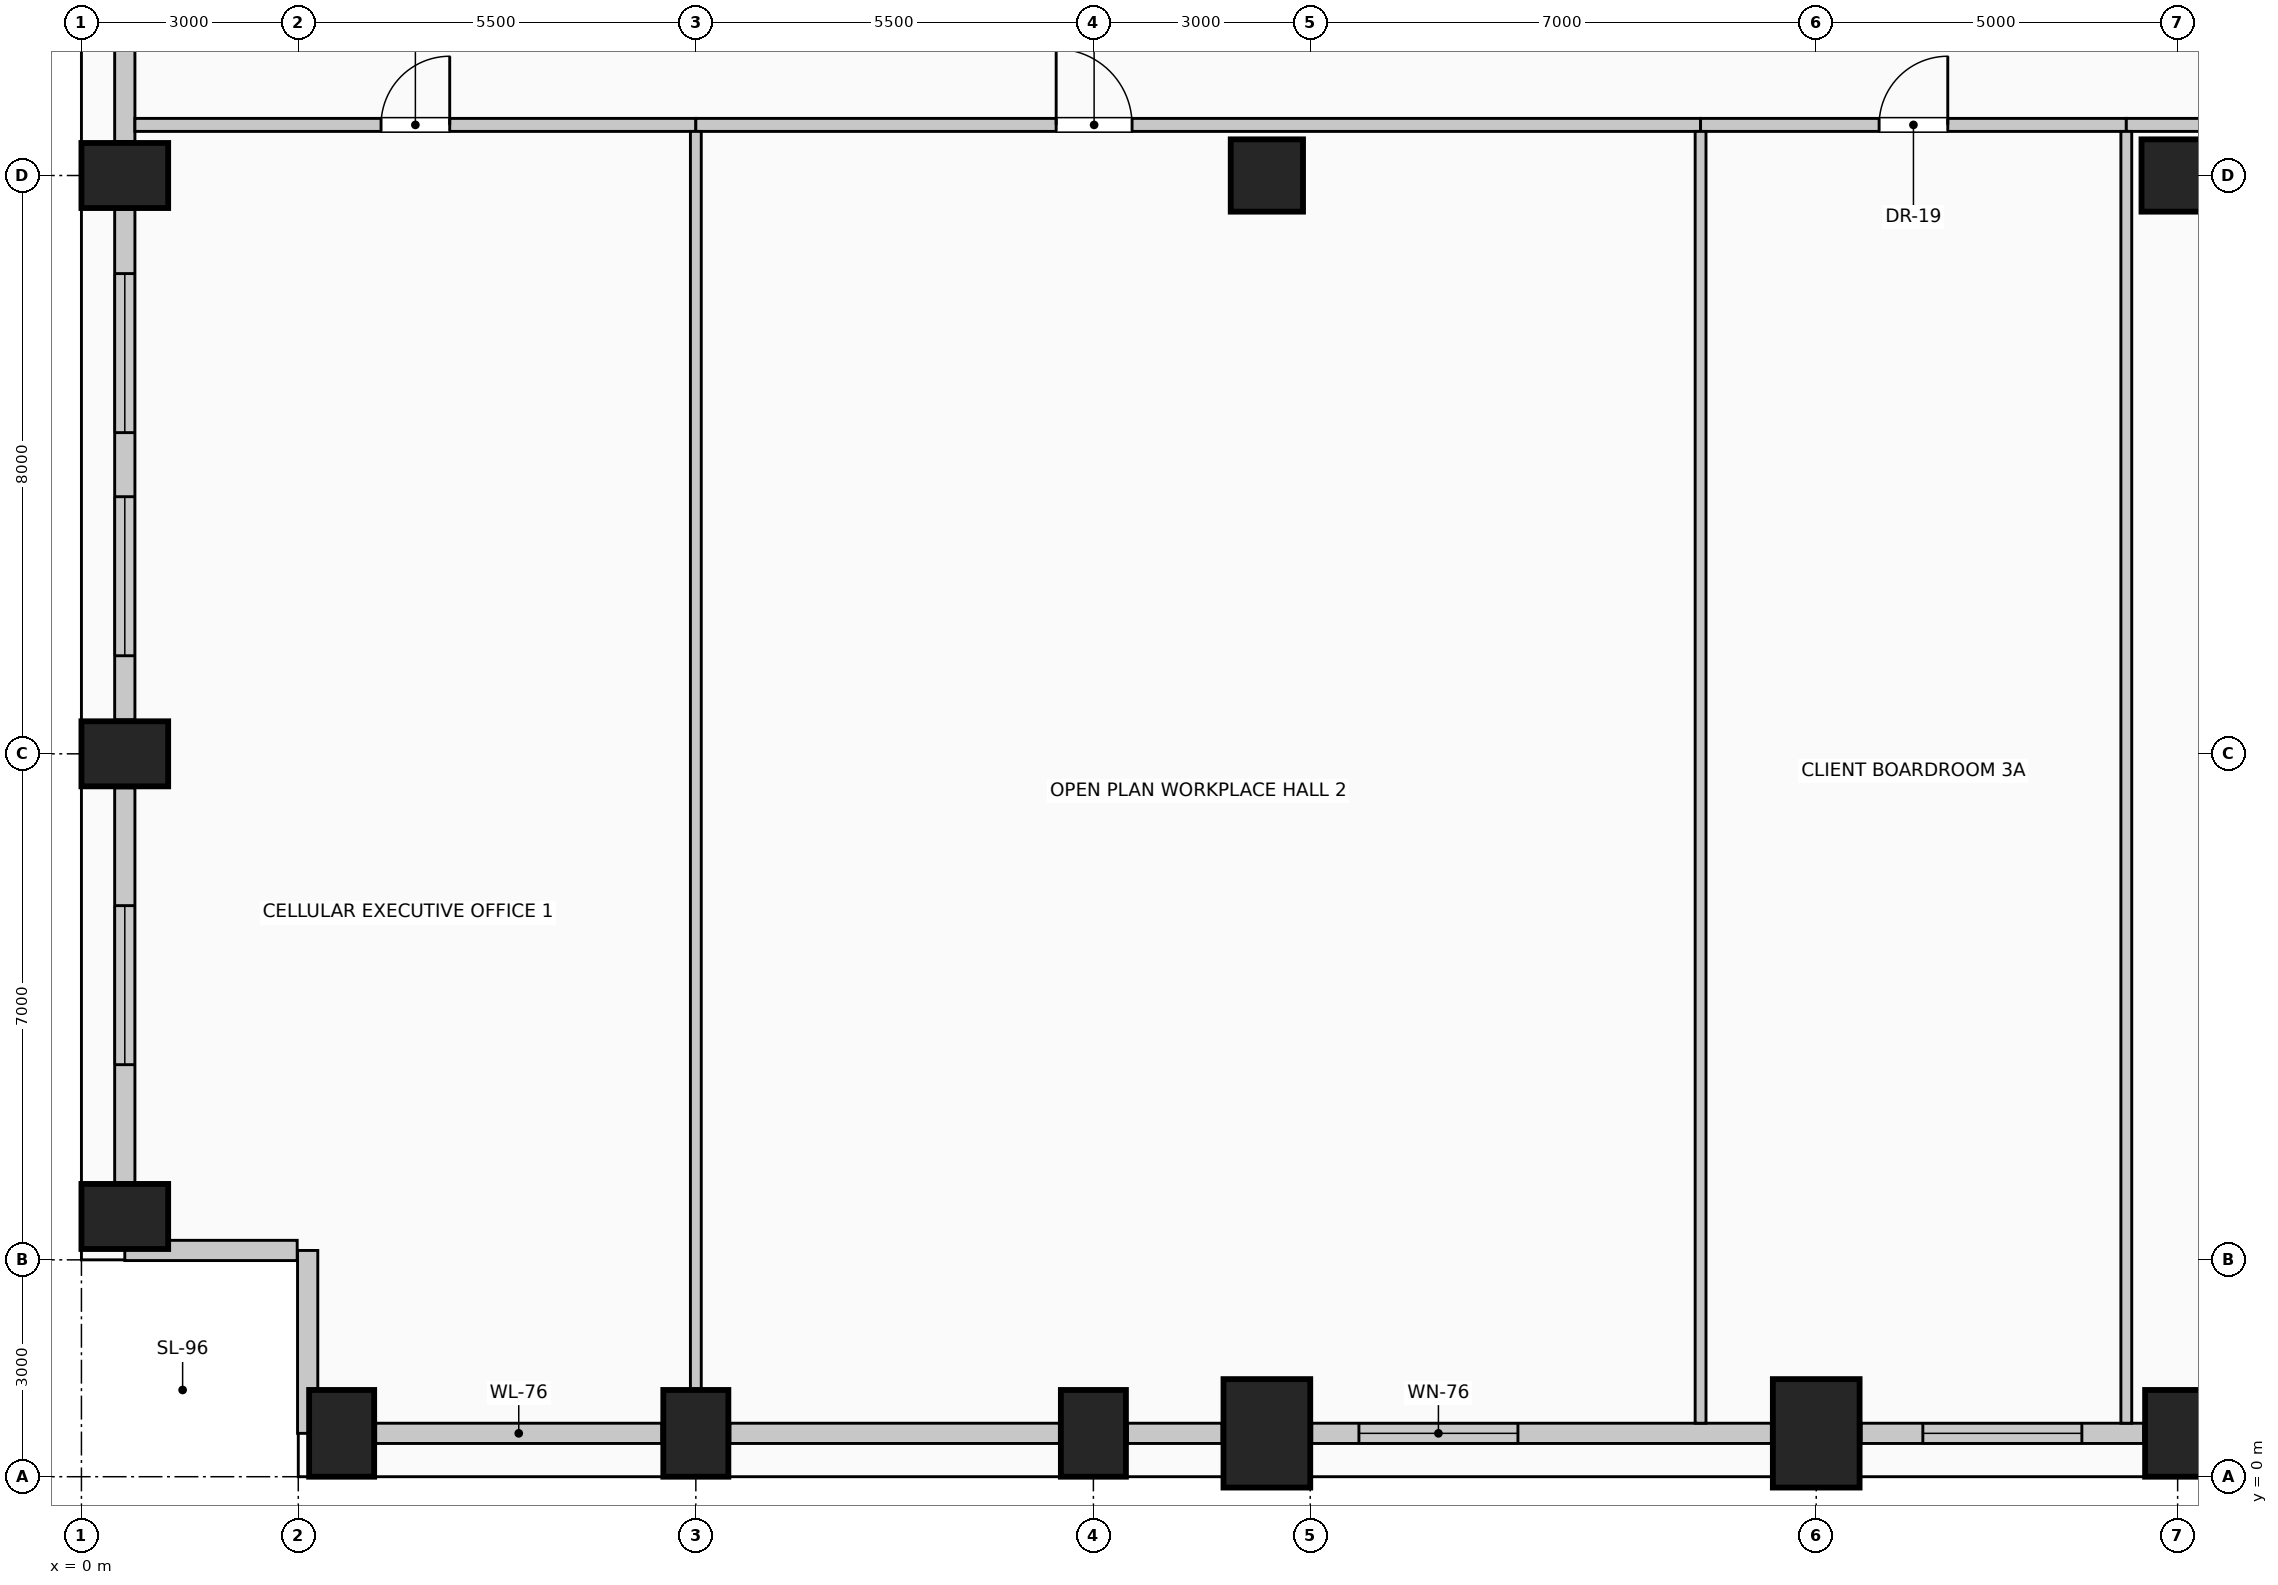
"""IFC4 building model, lengths in metres.
Left out: names, types, materials, properties, quantities, classifications, styles, units other than length and angle.
Written with IfcOpenShell. Run it as: python <this file> out.ifc"""

import sys

from ifc_helpers import new_model, si_unit, direction, frame, frame_2d, origin, origin_2d, place, context, subcontext, project, spatial, rectangle, circle, extrude, element, fill, save


model = new_model("IFC4")
c1 = context("Model", 3, precision=1e-05, world=origin(), true_north=direction((0.0, 1.0)))
c2 = subcontext(c1, "Body", "Model", "MODEL_VIEW")
j1 = project(units=[si_unit("LENGTHUNIT", "METRE"), si_unit("PLANEANGLEUNIT", "RADIAN")], contexts=[c1])
p1 = place(None, origin())
s1 = spatial("IfcSite", under=j1, at=p1, CompositionType="ELEMENT")
p2 = place(p1, origin())
s2 = spatial("IfcBuilding", under=s1, at=p2, CompositionType="ELEMENT")
p3 = place(p2, frame((0.0, 0.0, 74.6)))
s3 = spatial("IfcBuildingStorey", under=s2, at=p3, CompositionType="ELEMENT", Elevation=74.6)
for number, where, z_axis, x_axis in (
    (1, (3.6, 0.6, 0.0), (0.0, 0.0, 1.0), (1.0, 0.0, 0.0)),
    (2, (8.5, 0.6, 0.0), (0.0, 0.0, 1.0), (1.0, 0.0, 0.0)),
    (3, (14.0, 0.6, 0.0), (0.0, 0.0, 1.0), (1.0, 0.0, 0.0)),
):
    element("IfcColumn", number, at=place(p3, frame(where, z_axis=z_axis, x_axis=x_axis)), inside=s3, PredefinedType="COLUMN", context=c2, shape_type="SweptSolid", body=[
        extrude(rectangle(XDim=0.9, YDim=1.2, at=origin_2d()), origin(), (0.0, 0.0, 1.0), 4.0),
    ])
for number, where, z_axis, x_axis in (
    (4, (16.4, 0.6, 0.0), (0.0, 0.0, 1.0), (1.0, 0.0, 0.0)),
    (5, (24.0, 0.6, 0.0), (0.0, 0.0, 1.0), (1.0, 0.0, 0.0)),
):
    element("IfcColumn", number, at=place(p3, frame(where, z_axis=z_axis, x_axis=x_axis)), inside=s3, PredefinedType="COLUMN", context=c2, shape_type="SweptSolid", body=[
        extrude(rectangle(XDim=1.2, YDim=1.5, at=origin_2d()), origin(), (0.0, 0.0, 1.0), 4.0),
    ])
for number, where, z_axis, x_axis in (
    (6, (29.0, 0.6, 0.0), (0.0, 0.0, 1.0), (1.0, 0.0, 0.0)),
    (7, (0.6, 3.6, 0.0), (0.0, 0.0, 1.0), (0.0, 1.0, 0.0)),
    (8, (0.6, 10.0, 0.0), (0.0, 0.0, 1.0), (0.0, 1.0, 0.0)),
    (9, (0.6, 18.0, 0.0), (0.0, 0.0, 1.0), (0.0, 1.0, 0.0)),
):
    element("IfcColumn", number, at=place(p3, frame(where, z_axis=z_axis, x_axis=x_axis)), inside=s3, PredefinedType="COLUMN", context=c2, shape_type="SweptSolid", body=[
        extrude(rectangle(XDim=0.9, YDim=1.2, at=origin_2d()), origin(), (0.0, 0.0, 1.0), 4.0),
    ])
for number, where, z_axis, x_axis in (
    (10, (16.4, 18.0, 0.0), (0.0, 0.0, 1.0), (1.0, 0.0, 0.0)),
    (11, (29.0, 18.0, 0.0), (0.0, 0.0, 1.0), (1.0, 0.0, 0.0)),
):
    element("IfcColumn", number, at=place(p3, frame(where, z_axis=z_axis, x_axis=x_axis)), inside=s3, PredefinedType="COLUMN", context=c2, shape_type="SweptSolid", body=[
        extrude(circle(Radius=0.5, at=origin_2d()), origin(), (0.0, 0.0, 1.0), 4.0),
    ])
p4 = place(p3, frame((8.03, 0.6, 0.0), z_axis=(0.0, 0.0, 1.0), x_axis=(-1.0, 0.0, 0.0)))
e12 = element("IfcWall", 12, at=p4, inside=s3, PredefinedType="SOLIDWALL", context=c2, shape_type="SweptSolid", body=[
    extrude(rectangle(XDim=3.96, YDim=0.28, at=frame_2d((1.98, 0.0))), origin(), (0.0, 0.0, 1.0), 2.85),
])
p5 = place(p3, frame((13.53, 0.6, 0.0), z_axis=(0.0, 0.0, 1.0), x_axis=(-1.0, 0.0, 0.0)))
e13 = element("IfcWall", 13, at=p5, inside=s3, PredefinedType="SOLIDWALL", context=c2, shape_type="SweptSolid", body=[
    extrude(rectangle(XDim=4.56, YDim=0.28, at=frame_2d((2.28, 0.0))), origin(), (0.0, 0.0, 1.0), 2.85),
])
p6 = place(p3, frame((15.78, 0.6, 0.0), z_axis=(0.0, 0.0, 1.0), x_axis=(-1.0, 0.0, 0.0)))
e14 = element("IfcWall", 14, at=p6, inside=s3, PredefinedType="SOLIDWALL", context=c2, shape_type="SweptSolid", body=[
    extrude(rectangle(XDim=1.31, YDim=0.28, at=frame_2d((0.655, 0.0))), origin(), (0.0, 0.0, 1.0), 2.85),
])
p7 = place(p3, frame((23.38, 0.6, 0.0), z_axis=(0.0, 0.0, 1.0), x_axis=(-1.0, 0.0, 0.0)))
e15 = element("IfcWall", 15, at=p7, inside=s3, PredefinedType="SOLIDWALL", context=c2, shape_type="SweptSolid", body=[
    extrude(rectangle(XDim=6.36, YDim=0.28, at=frame_2d((3.18, 0.0))), origin(), (0.0, 0.0, 1.0), 2.85),
])
p8 = place(p7, frame((3.507, 0.0, 0.5)))
e16 = element("IfcOpeningElement", 16, at=p8, cuts=e15, PredefinedType="OPENING", context=c2, shape_type="SweptSolid", body=[
    extrude(rectangle(XDim=2.2, YDim=1.95, at=frame_2d((1.1, 0.975))), frame((0.0, 0.15, 0.0), z_axis=(0.0, -1.0, 0.0), x_axis=(1.0, 0.0, 0.0)), (0.0, 0.0, 1.0), 0.3),
])
p9 = place(p3, frame((28.53, 0.6, 0.0), z_axis=(0.0, 0.0, 1.0), x_axis=(-1.0, 0.0, 0.0)))
e17 = element("IfcWall", 17, at=p9, inside=s3, PredefinedType="SOLIDWALL", context=c2, shape_type="SweptSolid", body=[
    extrude(rectangle(XDim=3.91, YDim=0.28, at=frame_2d((1.955, 0.0))), origin(), (0.0, 0.0, 1.0), 2.85),
])
p10 = place(p9, frame((0.855, 0.0, 0.5)))
e18 = element("IfcOpeningElement", 18, at=p10, cuts=e17, PredefinedType="OPENING", context=c2, shape_type="SweptSolid", body=[
    extrude(rectangle(XDim=2.2, YDim=1.95, at=frame_2d((1.1, 0.975))), frame((0.0, 0.15, 0.0), z_axis=(0.0, -1.0, 0.0), x_axis=(1.0, 0.0, 0.0)), (0.0, 0.0, 1.0), 0.3),
])
p11 = place(p3, frame((0.6, 4.07, 0.0), z_axis=(0.0, 0.0, 1.0), x_axis=(0.0, 1.0, 0.0)))
e19 = element("IfcWall", 19, at=p11, inside=s3, PredefinedType="SOLIDWALL", context=c2, shape_type="SweptSolid", body=[
    extrude(rectangle(XDim=5.46, YDim=0.28, at=frame_2d((2.73, 0.0))), origin(), (0.0, 0.0, 1.0), 2.85),
])
p12 = place(p11, frame((1.63, 0.0, 0.5)))
e20 = element("IfcOpeningElement", 20, at=p12, cuts=e19, PredefinedType="OPENING", context=c2, shape_type="SweptSolid", body=[
    extrude(rectangle(XDim=2.2, YDim=1.95, at=frame_2d((1.1, 0.975))), frame((0.0, 0.15, 0.0), z_axis=(0.0, -1.0, 0.0), x_axis=(1.0, 0.0, 0.0)), (0.0, 0.0, 1.0), 0.3),
])
p13 = place(p3, frame((0.6, 10.47, 0.0), z_axis=(0.0, 0.0, 1.0), x_axis=(0.0, 1.0, 0.0)))
e21 = element("IfcWall", 21, at=p13, inside=s3, PredefinedType="SOLIDWALL", context=c2, shape_type="SweptSolid", body=[
    extrude(rectangle(XDim=7.06, YDim=0.28, at=frame_2d((3.53, 0.0))), origin(), (0.0, 0.0, 1.0), 2.85),
])
p14 = place(p13, frame((0.887, 0.0, 0.5)))
e22 = element("IfcOpeningElement", 22, at=p14, cuts=e21, PredefinedType="OPENING", context=c2, shape_type="SweptSolid", body=[
    extrude(rectangle(XDim=2.2, YDim=1.95, at=frame_2d((1.1, 0.975))), frame((0.0, 0.15, 0.0), z_axis=(0.0, -1.0, 0.0), x_axis=(1.0, 0.0, 0.0)), (0.0, 0.0, 1.0), 0.3),
])
p15 = place(p13, frame((3.973, 0.0, 0.5)))
e23 = element("IfcOpeningElement", 23, at=p15, cuts=e21, PredefinedType="OPENING", context=c2, shape_type="SweptSolid", body=[
    extrude(rectangle(XDim=2.2, YDim=1.95, at=frame_2d((1.1, 0.975))), frame((0.0, 0.15, 0.0), z_axis=(0.0, -1.0, 0.0), x_axis=(1.0, 0.0, 0.0)), (0.0, 0.0, 1.0), 0.3),
])
p16 = place(p3, frame((0.6, 18.47, 0.0), z_axis=(0.0, 0.0, 1.0), x_axis=(0.0, 1.0, 0.0)))
e24 = element("IfcWall", 24, at=p16, inside=s3, PredefinedType="SOLIDWALL", context=c2, shape_type="SweptSolid", body=[
    extrude(rectangle(XDim=7.06, YDim=0.28, at=frame_2d((3.53, 0.0))), origin(), (0.0, 0.0, 1.0), 2.85),
])
p17 = place(p3, frame((3.13, 0.6, 0.0), z_axis=(0.0, 0.0, 1.0), x_axis=(0.0, 1.0, 0.0)))
e25 = element("IfcWall", 25, at=p17, inside=s3, PredefinedType="SOLIDWALL", context=c2, shape_type="SweptSolid", body=[
    extrude(rectangle(XDim=2.53, YDim=0.28, at=frame_2d((1.265, 0.0))), origin(), (0.0, 0.0, 1.0), 3.7),
])
p18 = place(p3, frame((2.985, 3.13, 0.0), z_axis=(0.0, 0.0, 1.0), x_axis=(-1.0, 0.0, 0.0)))
e26 = element("IfcWall", 26, at=p18, inside=s3, PredefinedType="SOLIDWALL", context=c2, shape_type="SweptSolid", body=[
    extrude(rectangle(XDim=2.385, YDim=0.28, at=frame_2d((1.192, 0.0))), origin(), (0.0, 0.0, 1.0), 3.7),
])
p19 = place(p3, frame((0.74, 18.7, 0.0), z_axis=(0.0, 0.0, 1.0), x_axis=(1.0, 0.0, 0.0)))
e27 = element("IfcWall", 27, at=p19, inside=s3, PredefinedType="PARTITIONING", context=c2, shape_type="SweptSolid", body=[
    extrude(rectangle(XDim=7.76, YDim=0.18, at=frame_2d((3.88, 0.0))), origin(), (0.0, 0.0, 1.0), 3.7),
])
p20 = place(p19, frame((3.405, 0.0, 0.0)))
e28 = element("IfcOpeningElement", 28, at=p20, cuts=e27, PredefinedType="OPENING", context=c2, shape_type="SweptSolid", body=[
    extrude(rectangle(XDim=0.95, YDim=2.15, at=frame_2d((0.475, 1.075))), frame((0.0, 0.1, 0.0), z_axis=(0.0, -1.0, 0.0), x_axis=(1.0, 0.0, 0.0)), (0.0, 0.0, 1.0), 0.2),
])
p21 = place(p3, frame((8.5, 18.7, 0.0), z_axis=(0.0, 0.0, 1.0), x_axis=(1.0, 0.0, 0.0)))
e29 = element("IfcWall", 29, at=p21, inside=s3, PredefinedType="PARTITIONING", context=c2, shape_type="SweptSolid", body=[
    extrude(rectangle(XDim=13.9, YDim=0.18, at=frame_2d((6.95, 0.0))), origin(), (0.0, 0.0, 1.0), 3.7),
])
p22 = place(p21, frame((4.985, 0.0, 0.0)))
e30 = element("IfcOpeningElement", 30, at=p22, cuts=e29, PredefinedType="OPENING", context=c2, shape_type="SweptSolid", body=[
    extrude(rectangle(XDim=1.05, YDim=2.15, at=frame_2d((0.525, 1.075))), frame((0.0, 0.1, 0.0), z_axis=(0.0, -1.0, 0.0), x_axis=(1.0, 0.0, 0.0)), (0.0, 0.0, 1.0), 0.2),
])
p23 = place(p3, frame((22.4, 18.7, 0.0), z_axis=(0.0, 0.0, 1.0), x_axis=(1.0, 0.0, 0.0)))
e31 = element("IfcWall", 31, at=p23, inside=s3, PredefinedType="PARTITIONING", context=c2, shape_type="SweptSolid", body=[
    extrude(rectangle(XDim=5.89, YDim=0.18, at=frame_2d((2.945, 0.0))), origin(), (0.0, 0.0, 1.0), 3.7),
])
p24 = place(p23, frame((2.47, 0.0, 0.0)))
e32 = element("IfcOpeningElement", 32, at=p24, cuts=e31, PredefinedType="OPENING", context=c2, shape_type="SweptSolid", body=[
    extrude(rectangle(XDim=0.95, YDim=2.15, at=frame_2d((0.475, 1.075))), frame((0.0, 0.1, 0.0), z_axis=(0.0, -1.0, 0.0), x_axis=(1.0, 0.0, 0.0)), (0.0, 0.0, 1.0), 0.2),
])
p25 = place(p3, frame((28.29, 18.7, 0.0), z_axis=(0.0, 0.0, 1.0), x_axis=(1.0, 0.0, 0.0)))
e33 = element("IfcWall", 33, at=p25, inside=s3, PredefinedType="PARTITIONING", context=c2, shape_type="SweptSolid", body=[
    extrude(rectangle(XDim=6.91, YDim=0.18, at=frame_2d((3.455, 0.0))), origin(), (0.0, 0.0, 1.0), 3.7),
])
p26 = place(p25, frame((2.93, 0.0, 0.0)))
e34 = element("IfcOpeningElement", 34, at=p26, cuts=e33, PredefinedType="OPENING", context=c2, shape_type="SweptSolid", body=[
    extrude(rectangle(XDim=1.05, YDim=2.15, at=frame_2d((0.525, 1.075))), frame((0.0, 0.1, 0.0), z_axis=(0.0, -1.0, 0.0), x_axis=(1.0, 0.0, 0.0)), (0.0, 0.0, 1.0), 0.2),
])
p27 = place(p3, frame((8.5, 1.2, 0.0), z_axis=(0.0, 0.0, 1.0), x_axis=(0.0, 1.0, 0.0)))
e35 = element("IfcWall", 35, at=p27, inside=s3, PredefinedType="PARTITIONING", context=c2, shape_type="SweptSolid", body=[
    extrude(rectangle(XDim=17.41, YDim=0.15, at=frame_2d((8.705, 0.0))), origin(), (0.0, 0.0, 1.0), 3.7),
])
for number, where, z_axis, x_axis in (
    (36, (22.4, 0.74, 0.0), (0.0, 0.0, 1.0), (0.0, 1.0, 0.0)),
    (37, (28.29, 0.74, 0.0), (0.0, 0.0, 1.0), (0.0, 1.0, 0.0)),
):
    element("IfcWall", number, at=place(p3, frame(where, z_axis=z_axis, x_axis=x_axis)), inside=s3, PredefinedType="PARTITIONING", context=c2, shape_type="SweptSolid", body=[
        extrude(rectangle(XDim=17.87, YDim=0.15, at=frame_2d((8.935, 0.0))), origin(), (0.0, 0.0, 1.0), 3.7),
    ])
p28 = place(p8, origin())
e38 = element("IfcWindow", 38, at=p28, inside=s3, PartitioningType="SINGLE_PANEL", PredefinedType="WINDOW", context=c2, shape_type="SweptSolid", body=[
    extrude(rectangle(XDim=2.2, YDim=1.95, at=frame_2d((1.1, 0.975))), frame((0.0, 0.03, 0.0), z_axis=(0.0, -1.0, 0.0), x_axis=(1.0, 0.0, 0.0)), (0.0, 0.0, 1.0), 0.06),
])
fill(e16, e38)
p29 = place(p10, origin())
e39 = element("IfcWindow", 39, at=p29, inside=s3, PartitioningType="SINGLE_PANEL", PredefinedType="WINDOW", context=c2, shape_type="SweptSolid", body=[
    extrude(rectangle(XDim=2.2, YDim=1.95, at=frame_2d((1.1, 0.975))), frame((0.0, 0.03, 0.0), z_axis=(0.0, -1.0, 0.0), x_axis=(1.0, 0.0, 0.0)), (0.0, 0.0, 1.0), 0.06),
])
fill(e18, e39)
p30 = place(p12, origin())
e40 = element("IfcWindow", 40, at=p30, inside=s3, PartitioningType="SINGLE_PANEL", PredefinedType="WINDOW", context=c2, shape_type="SweptSolid", body=[
    extrude(rectangle(XDim=2.2, YDim=1.95, at=frame_2d((1.1, 0.975))), frame((0.0, 0.03, 0.0), z_axis=(0.0, -1.0, 0.0), x_axis=(1.0, 0.0, 0.0)), (0.0, 0.0, 1.0), 0.06),
])
fill(e20, e40)
p31 = place(p14, origin())
e41 = element("IfcWindow", 41, at=p31, inside=s3, PartitioningType="SINGLE_PANEL", PredefinedType="WINDOW", context=c2, shape_type="SweptSolid", body=[
    extrude(rectangle(XDim=2.2, YDim=1.95, at=frame_2d((1.1, 0.975))), frame((0.0, 0.03, 0.0), z_axis=(0.0, -1.0, 0.0), x_axis=(1.0, 0.0, 0.0)), (0.0, 0.0, 1.0), 0.06),
])
fill(e22, e41)
p32 = place(p15, origin())
e42 = element("IfcWindow", 42, at=p32, inside=s3, PartitioningType="SINGLE_PANEL", PredefinedType="WINDOW", context=c2, shape_type="SweptSolid", body=[
    extrude(rectangle(XDim=2.2, YDim=1.95, at=frame_2d((1.1, 0.975))), frame((0.0, 0.03, 0.0), z_axis=(0.0, -1.0, 0.0), x_axis=(1.0, 0.0, 0.0)), (0.0, 0.0, 1.0), 0.06),
])
fill(e23, e42)
p33 = place(p20, origin())
e43 = element("IfcDoor", 43, at=p33, inside=s3, OperationType="SINGLE_SWING_RIGHT", PredefinedType="DOOR", context=c2, shape_type="SweptSolid", body=[
    extrude(rectangle(XDim=0.95, YDim=2.15, at=frame_2d((0.475, 1.075))), frame((0.0, 0.025, 0.0), z_axis=(0.0, -1.0, 0.0), x_axis=(1.0, 0.0, 0.0)), (0.0, 0.0, 1.0), 0.05),
])
fill(e28, e43)
p34 = place(p22, origin())
e44 = element("IfcDoor", 44, at=p34, inside=s3, OperationType="SINGLE_SWING_LEFT", PredefinedType="DOOR", context=c2, shape_type="SweptSolid", body=[
    extrude(rectangle(XDim=1.05, YDim=2.15, at=frame_2d((0.525, 1.075))), frame((0.0, 0.025, 0.0), z_axis=(0.0, -1.0, 0.0), x_axis=(1.0, 0.0, 0.0)), (0.0, 0.0, 1.0), 0.05),
])
fill(e30, e44)
p35 = place(p24, origin())
e45 = element("IfcDoor", 45, at=p35, inside=s3, OperationType="SINGLE_SWING_RIGHT", PredefinedType="DOOR", context=c2, shape_type="SweptSolid", body=[
    extrude(rectangle(XDim=0.95, YDim=2.15, at=frame_2d((0.475, 1.075))), frame((0.0, 0.025, 0.0), z_axis=(0.0, -1.0, 0.0), x_axis=(1.0, 0.0, 0.0)), (0.0, 0.0, 1.0), 0.05),
])
fill(e32, e45)
save(model, sys.argv[1])
